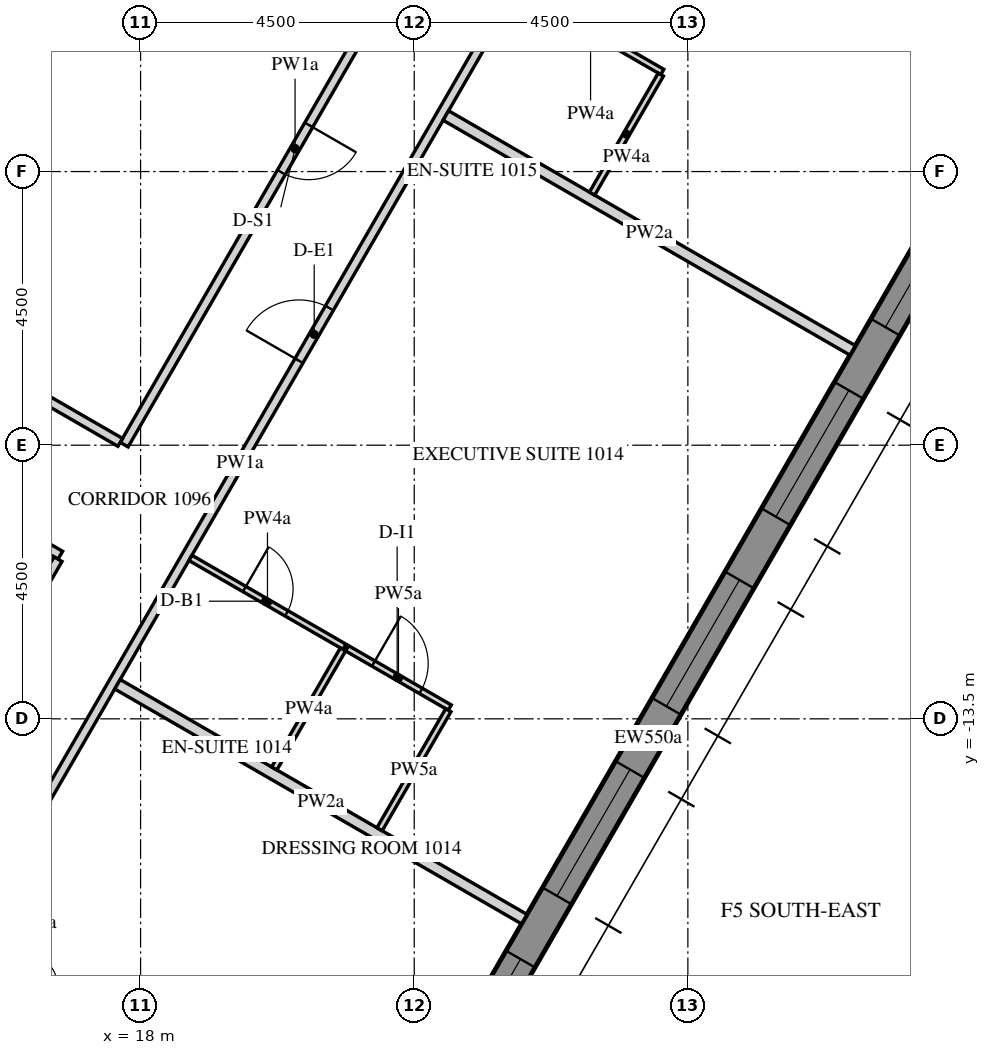
"""IFC4 building model, lengths in metres.
Left out: names, types, materials, properties, quantities, classifications, styles, units other than length and angle.
Written with IfcOpenShell. Run it as: python <this file> out.ifc"""

import sys

from ifc_helpers import new_model, si_unit, direction, frame, frame_2d, origin, place, context, subcontext, project, spatial, polyline, rectangle, outline, extrude, element, fill, save


model = new_model("IFC4")
c1 = context("Model", 3, precision=1e-05, world=origin(), true_north=direction((0.0, 1.0)))
c2 = subcontext(c1, "Body", "Model", "MODEL_VIEW")
j1 = project(units=[si_unit("LENGTHUNIT", "METRE"), si_unit("PLANEANGLEUNIT", "RADIAN")], contexts=[c1])
p1 = place(None, origin())
s1 = spatial("IfcSite", under=j1, at=p1, CompositionType="ELEMENT")
p2 = place(p1, origin())
s2 = spatial("IfcBuilding", under=s1, at=p2, CompositionType="ELEMENT")
p3 = place(p2, frame((0.0, 0.0, 142.8)))
s3 = spatial("IfcBuildingStorey", under=s2, at=p3, CompositionType="ELEMENT", Elevation=142.8)
p4 = place(p3, frame((18.83, -26.835, -0.15), z_axis=(0.0, 0.0, 1.0), x_axis=(0.500003800416, 0.866023209602, 0.0)))
e1 = element("IfcWall", 1, at=p4, inside=s3, PredefinedType="SOLIDWALL", context=c2, shape_type="SweptSolid", body=[
    extrude(outline(polyline([(-0.022, -0.275), (30.097, -0.275), (30.045, 0.275), (0.022, 0.275), (-0.022, -0.275)])), origin(), (0.0, 0.0, 1.0), 3.75),
])
p5 = place(p4, frame((1.236, 0.0, 1.05)))
e2 = element("IfcOpeningElement", 2, at=p5, cuts=e1, PredefinedType="OPENING", context=c2, shape_type="SweptSolid", body=[
    extrude(rectangle(XDim=2.4, YDim=2.4, at=frame_2d((1.2, 1.2))), frame((0.0, 0.285, 0.0), z_axis=(0.0, -1.0, 0.0), x_axis=(1.0, 0.0, 0.0)), (0.0, 0.0, 1.0), 0.57),
])
p6 = place(p4, frame((4.835, 0.0, 1.05)))
e3 = element("IfcOpeningElement", 3, at=p6, cuts=e1, PredefinedType="OPENING", context=c2, shape_type="SweptSolid", body=[
    extrude(rectangle(XDim=2.4, YDim=2.4, at=frame_2d((1.2, 1.2))), frame((0.0, 0.285, 0.0), z_axis=(0.0, -1.0, 0.0), x_axis=(1.0, 0.0, 0.0)), (0.0, 0.0, 1.0), 0.57),
])
p7 = place(p4, frame((8.436, 0.0, 1.05)))
e4 = element("IfcOpeningElement", 4, at=p7, cuts=e1, PredefinedType="OPENING", context=c2, shape_type="SweptSolid", body=[
    extrude(rectangle(XDim=2.4, YDim=2.4, at=frame_2d((1.2, 1.2))), frame((0.0, 0.285, 0.0), z_axis=(0.0, -1.0, 0.0), x_axis=(1.0, 0.0, 0.0)), (0.0, 0.0, 1.0), 0.57),
])
p8 = place(p4, frame((12.035, 0.0, 1.05)))
e5 = element("IfcOpeningElement", 5, at=p8, cuts=e1, PredefinedType="OPENING", context=c2, shape_type="SweptSolid", body=[
    extrude(rectangle(XDim=2.4, YDim=2.4, at=frame_2d((1.2, 1.2))), frame((0.0, 0.285, 0.0), z_axis=(0.0, -1.0, 0.0), x_axis=(1.0, 0.0, 0.0)), (0.0, 0.0, 1.0), 0.57),
])
p9 = place(p4, frame((15.635, 0.0, 1.05)))
e6 = element("IfcOpeningElement", 6, at=p9, cuts=e1, PredefinedType="OPENING", context=c2, shape_type="SweptSolid", body=[
    extrude(rectangle(XDim=2.4, YDim=2.4, at=frame_2d((1.2, 1.2))), frame((0.0, 0.285, 0.0), z_axis=(0.0, -1.0, 0.0), x_axis=(1.0, 0.0, 0.0)), (0.0, 0.0, 1.0), 0.57),
])
p10 = place(p4, frame((19.236, 0.0, 1.05)))
e7 = element("IfcOpeningElement", 7, at=p10, cuts=e1, PredefinedType="OPENING", context=c2, shape_type="SweptSolid", body=[
    extrude(rectangle(XDim=2.4, YDim=2.4, at=frame_2d((1.2, 1.2))), frame((0.0, 0.285, 0.0), z_axis=(0.0, -1.0, 0.0), x_axis=(1.0, 0.0, 0.0)), (0.0, 0.0, 1.0), 0.57),
])
p11 = place(p4, frame((22.835, 0.0, 1.05)))
e8 = element("IfcOpeningElement", 8, at=p11, cuts=e1, PredefinedType="OPENING", context=c2, shape_type="SweptSolid", body=[
    extrude(rectangle(XDim=2.4, YDim=2.4, at=frame_2d((1.2, 1.2))), frame((0.0, 0.285, 0.0), z_axis=(0.0, -1.0, 0.0), x_axis=(1.0, 0.0, 0.0)), (0.0, 0.0, 1.0), 0.57),
])
p12 = place(p4, frame((26.436, 0.0, 1.05)))
e9 = element("IfcOpeningElement", 9, at=p12, cuts=e1, PredefinedType="OPENING", context=c2, shape_type="SweptSolid", body=[
    extrude(rectangle(XDim=2.4, YDim=2.4, at=frame_2d((1.2, 1.2))), frame((0.0, 0.285, 0.0), z_axis=(0.0, -1.0, 0.0), x_axis=(1.0, 0.0, 0.0)), (0.0, 0.0, 1.0), 0.57),
])
p13 = place(p3, frame((8.083, -14.0, -0.15), z_axis=(0.0, 0.0, 1.0), x_axis=(0.499997680643, -0.866026742862, 0.0)))
e10 = element("IfcWall", 10, at=p13, inside=s3, PredefinedType="SHEAR", context=c2, shape_type="SweptSolid", body=[
    extrude(rectangle(XDim=16.509, YDim=0.6, at=frame_2d((8.254, 0.0))), origin(), (0.0, 0.0, 1.0), 3.75),
])
p14 = place(p13, frame((7.354, 0.0, 0.15)))
e11 = element("IfcOpeningElement", 11, at=p14, cuts=e10, PredefinedType="OPENING", context=c2, shape_type="SweptSolid", body=[
    extrude(rectangle(XDim=1.8, YDim=2.4, at=frame_2d((0.9, 1.2))), frame((0.0, 0.31, 0.0), z_axis=(0.0, -1.0, 0.0), x_axis=(1.0, 0.0, 0.0)), (0.0, 0.0, 1.0), 0.62),
])
p15 = place(p3, frame((13.755, -19.475, 0.0), z_axis=(0.0, 0.0, 1.0), x_axis=(0.50000013933, 0.866025323342, 0.0)))
e12 = element("IfcWall", 12, at=p15, inside=s3, PredefinedType="PARTITIONING", context=c2, shape_type="SweptSolid", body=[
    extrude(rectangle(XDim=23.517, YDim=0.15, at=frame_2d((11.758, 0.0))), origin(), (0.0, 0.0, 1.0), 2.838),
])
p16 = place(p15, frame((4.456, 0.0, 0.0)))
e13 = element("IfcOpeningElement", 13, at=p16, cuts=e12, PredefinedType="OPENING", context=c2, shape_type="SweptSolid", body=[
    extrude(rectangle(XDim=1.0, YDim=2.1, at=frame_2d((0.5, 1.05))), frame((0.0, 0.085, 0.0), z_axis=(0.0, -1.0, 0.0), x_axis=(1.0, 0.0, 0.0)), (0.0, 0.0, 1.0), 0.17),
])
p17 = place(p15, frame((13.699, 0.0, 0.0)))
e14 = element("IfcOpeningElement", 14, at=p17, cuts=e12, PredefinedType="OPENING", context=c2, shape_type="SweptSolid", body=[
    extrude(rectangle(XDim=1.0, YDim=2.1, at=frame_2d((0.5, 1.05))), frame((0.0, 0.085, 0.0), z_axis=(0.0, -1.0, 0.0), x_axis=(1.0, 0.0, 0.0)), (0.0, 0.0, 1.0), 0.17),
])
p18 = place(p15, frame((21.658, 0.0, 0.0)))
e15 = element("IfcOpeningElement", 15, at=p18, cuts=e12, PredefinedType="OPENING", context=c2, shape_type="SweptSolid", body=[
    extrude(rectangle(XDim=1.0, YDim=2.1, at=frame_2d((0.5, 1.05))), frame((0.0, 0.085, 0.0), z_axis=(0.0, -1.0, 0.0), x_axis=(1.0, 0.0, 0.0)), (0.0, 0.0, 1.0), 0.17),
])
p19 = place(p3, frame((23.351, 0.745, 0.0), z_axis=(0.0, 0.0, 1.0), x_axis=(-0.500009458068, -0.866019943097, 0.0)))
e16 = element("IfcWall", 16, at=p19, inside=s3, PredefinedType="PARTITIONING", context=c2, shape_type="SweptSolid", body=[
    extrude(rectangle(XDim=11.241, YDim=0.15, at=frame_2d((5.621, 0.0))), origin(), (0.0, 0.0, 1.0), 2.838),
])
p20 = place(p19, frame((5.171, 0.0, 0.0)))
e17 = element("IfcOpeningElement", 17, at=p20, cuts=e16, PredefinedType="OPENING", context=c2, shape_type="SweptSolid", body=[
    extrude(rectangle(XDim=0.9, YDim=2.1, at=frame_2d((0.45, 1.05))), frame((0.0, 0.085, 0.0), z_axis=(0.0, -1.0, 0.0), x_axis=(1.0, 0.0, 0.0)), (0.0, 0.0, 1.0), 0.17),
])
p21 = place(p3, frame((17.665, -8.953, 0.0), z_axis=(0.0, 0.0, 1.0), x_axis=(-0.866025774745, 0.499999357477, 0.0)))
e18 = element("IfcWall", 18, at=p21, inside=s3, PredefinedType="PARTITIONING", context=c2, shape_type="SweptSolid", body=[
    extrude(rectangle(XDim=5.775, YDim=0.15, at=frame_2d((2.887, 0.0))), origin(), (0.0, 0.0, 1.0), 2.838),
])
p22 = place(p3, frame((11.614, -7.884, 0.0), z_axis=(0.0, 0.0, 1.0), x_axis=(0.866018092707, -0.500012662943, 0.0)))
e19 = element("IfcWall", 19, at=p22, inside=s3, PredefinedType="PARTITIONING", context=c2, shape_type="SweptSolid", body=[
    extrude(rectangle(XDim=5.85, YDim=0.15, at=frame_2d((2.925, 0.0))), origin(), (0.0, 0.0, 1.0), 2.838),
])
p23 = place(p3, frame((16.643, -10.874, 0.0), z_axis=(0.0, 0.0, 1.0), x_axis=(-0.50000192383, -0.866024293058, 0.0)))
e20 = element("IfcWall", 20, at=p23, inside=s3, PredefinedType="PARTITIONING", context=c2, shape_type="SweptSolid", body=[
    extrude(rectangle(XDim=8.293, YDim=0.15, at=frame_2d((4.146, 0.0))), origin(), (0.0, 0.0, 1.0), 2.838),
])
p24 = place(p23, frame((3.697, 0.0, 0.0)))
e21 = element("IfcOpeningElement", 21, at=p24, cuts=e20, PredefinedType="OPENING", context=c2, shape_type="SweptSolid", body=[
    extrude(rectangle(XDim=0.9, YDim=2.1, at=frame_2d((0.45, 1.05))), frame((0.0, 0.085, 0.0), z_axis=(0.0, -1.0, 0.0), x_axis=(1.0, 0.0, 0.0)), (0.0, 0.0, 1.0), 0.17),
])
p25 = place(p3, frame((14.977, -17.509, 0.0), z_axis=(0.0, 0.0, 1.0), x_axis=(0.866046596414, -0.499963291492, 0.0)))
e22 = element("IfcWall", 22, at=p25, inside=s3, PredefinedType="PARTITIONING", context=c2, shape_type="SweptSolid", body=[
    extrude(rectangle(XDim=2.925, YDim=0.1, at=frame_2d((1.462, 0.0))), origin(), (0.0, 0.0, 1.0), 2.838),
])
p26 = place(p25, frame((1.025, 0.0, 0.0)))
e23 = element("IfcOpeningElement", 23, at=p26, cuts=e22, PredefinedType="OPENING", context=c2, shape_type="SweptSolid", body=[
    extrude(rectangle(XDim=0.8, YDim=2.1, at=frame_2d((0.4, 1.05))), frame((0.0, 0.06, 0.0), z_axis=(0.0, -1.0, 0.0), x_axis=(1.0, 0.0, 0.0)), (0.0, 0.0, 1.0), 0.12),
])
p27 = place(p3, frame((24.31, -16.794, 0.0), z_axis=(0.0, 0.0, 1.0), x_axis=(-0.866027174938, 0.499996932259, 0.0)))
e24 = element("IfcWall", 24, at=p27, inside=s3, PredefinedType="PARTITIONING", context=c2, shape_type="SweptSolid", body=[
    extrude(rectangle(XDim=7.725, YDim=0.18, at=frame_2d((3.863, 0.0))), origin(), (0.0, 0.0, 1.0), 2.838),
])
p28 = place(p3, frame((18.82, -10.853, 0.0), z_axis=(0.0, 0.0, 1.0), x_axis=(0.866046596414, -0.499963291492, 0.0)))
e25 = element("IfcWall", 25, at=p28, inside=s3, PredefinedType="PARTITIONING", context=c2, shape_type="SweptSolid", body=[
    extrude(rectangle(XDim=2.925, YDim=0.1, at=frame_2d((1.462, 0.0))), origin(), (0.0, 0.0, 1.0), 2.838),
])
p29 = place(p28, frame((1.025, 0.0, 0.0)))
e26 = element("IfcOpeningElement", 26, at=p29, cuts=e25, PredefinedType="OPENING", context=c2, shape_type="SweptSolid", body=[
    extrude(rectangle(XDim=0.8, YDim=2.1, at=frame_2d((0.4, 1.05))), frame((0.0, 0.06, 0.0), z_axis=(0.0, -1.0, 0.0), x_axis=(1.0, 0.0, 0.0)), (0.0, 0.0, 1.0), 0.12),
])
p30 = place(p3, frame((21.396, -12.34, 0.0), z_axis=(0.0, 0.0, 1.0), x_axis=(0.866031321059, -0.49998975084, 0.0)))
e27 = element("IfcWall", 27, at=p30, inside=s3, PredefinedType="PARTITIONING", context=c2, shape_type="SweptSolid", body=[
    extrude(rectangle(XDim=1.95, YDim=0.1, at=frame_2d((0.975, 0.0))), origin(), (0.0, 0.0, 1.0), 2.838),
])
p31 = place(p30, frame((0.5, 0.0, 0.0)))
e28 = element("IfcOpeningElement", 28, at=p31, cuts=e27, PredefinedType="OPENING", context=c2, shape_type="SweptSolid", body=[
    extrude(rectangle(XDim=0.9, YDim=2.1, at=frame_2d((0.45, 1.05))), frame((0.0, 0.06, 0.0), z_axis=(0.0, -1.0, 0.0), x_axis=(1.0, 0.0, 0.0)), (0.0, 0.0, 1.0), 0.12),
])
p32 = place(p3, frame((23.06, -13.359, 0.0), z_axis=(0.0, 0.0, 1.0), x_axis=(-0.49995000081, -0.866054268906, 0.0)))
e29 = element("IfcWall", 29, at=p32, inside=s3, PredefinedType="PARTITIONING", context=c2, shape_type="SweptSolid", body=[
    extrude(rectangle(XDim=2.26, YDim=0.1, at=frame_2d((1.13, 0.0))), origin(), (0.0, 0.0, 1.0), 2.838),
])
p33 = place(p3, frame((29.71, -7.441, 0.0), z_axis=(0.0, 0.0, 1.0), x_axis=(-0.866019273868, 0.500010617176, 0.0)))
e30 = element("IfcWall", 30, at=p33, inside=s3, PredefinedType="PARTITIONING", context=c2, shape_type="SweptSolid", body=[
    extrude(rectangle(XDim=7.725, YDim=0.18, at=frame_2d((3.862, 0.0))), origin(), (0.0, 0.0, 1.0), 2.838),
])
p34 = place(p3, frame((20.198, -14.316, 0.0), z_axis=(0.0, 0.0, 1.0), x_axis=(0.500031020067, 0.8660074936, 0.0)))
e31 = element("IfcWall", 31, at=p34, inside=s3, PredefinedType="PARTITIONING", context=c2, shape_type="SweptSolid", body=[
    extrude(rectangle(XDim=2.26, YDim=0.1, at=frame_2d((1.13, 0.0))), origin(), (0.0, 0.0, 1.0), 2.838),
])
p35 = place(p3, frame((24.22, -1.5, 0.0), z_axis=(0.0, 0.0, 1.0), x_axis=(0.866012511928, -0.500022328685, 0.0)))
e32 = element("IfcWall", 32, at=p35, inside=s3, PredefinedType="PARTITIONING", context=c2, shape_type="SweptSolid", body=[
    extrude(rectangle(XDim=2.725, YDim=0.1, at=frame_2d((1.363, 0.0))), origin(), (0.0, 0.0, 1.0), 2.838),
])
p36 = place(p35, frame((0.925, 0.0, 0.0)))
e33 = element("IfcOpeningElement", 33, at=p36, cuts=e32, PredefinedType="OPENING", context=c2, shape_type="SweptSolid", body=[
    extrude(rectangle(XDim=0.8, YDim=2.1, at=frame_2d((0.4, 1.05))), frame((0.0, 0.06, 0.0), z_axis=(0.0, -1.0, 0.0), x_axis=(1.0, 0.0, 0.0)), (0.0, 0.0, 1.0), 0.12),
])
p37 = place(p3, frame((26.555, -2.906, 0.0), z_axis=(0.0, 0.0, 1.0), x_axis=(-0.500077800282, -0.865980481111, 0.0)))
e34 = element("IfcWall", 34, at=p37, inside=s3, PredefinedType="PARTITIONING", context=c2, shape_type="SweptSolid", body=[
    extrude(rectangle(XDim=2.26, YDim=0.1, at=frame_2d((1.13, 0.0))), origin(), (0.0, 0.0, 1.0), 2.838),
])
p38 = place(p7, frame((0.0, 0.205, 0.0)))
e35 = element("IfcWindow", 35, at=p38, inside=s3, PartitioningType="DOUBLE_PANEL_VERTICAL", PredefinedType="WINDOW", context=c2, shape_type="SweptSolid", body=[
    extrude(rectangle(XDim=2.4, YDim=2.4, at=frame_2d((1.2, 1.2))), frame((0.0, 0.03, 0.0), z_axis=(0.0, -1.0, 0.0), x_axis=(1.0, 0.0, 0.0)), (0.0, 0.0, 1.0), 0.06),
])
fill(e4, e35)
p39 = place(p8, frame((0.0, 0.205, 0.0)))
e36 = element("IfcWindow", 36, at=p39, inside=s3, PartitioningType="DOUBLE_PANEL_VERTICAL", PredefinedType="WINDOW", context=c2, shape_type="SweptSolid", body=[
    extrude(rectangle(XDim=2.4, YDim=2.4, at=frame_2d((1.2, 1.2))), frame((0.0, 0.03, 0.0), z_axis=(0.0, -1.0, 0.0), x_axis=(1.0, 0.0, 0.0)), (0.0, 0.0, 1.0), 0.06),
])
fill(e5, e36)
p40 = place(p9, frame((0.0, 0.205, 0.0)))
e37 = element("IfcWindow", 37, at=p40, inside=s3, PartitioningType="DOUBLE_PANEL_VERTICAL", PredefinedType="WINDOW", context=c2, shape_type="SweptSolid", body=[
    extrude(rectangle(XDim=2.4, YDim=2.4, at=frame_2d((1.2, 1.2))), frame((0.0, 0.03, 0.0), z_axis=(0.0, -1.0, 0.0), x_axis=(1.0, 0.0, 0.0)), (0.0, 0.0, 1.0), 0.06),
])
fill(e6, e37)
p41 = place(p10, frame((0.0, 0.205, 0.0)))
e38 = element("IfcWindow", 38, at=p41, inside=s3, PartitioningType="DOUBLE_PANEL_VERTICAL", PredefinedType="WINDOW", context=c2, shape_type="SweptSolid", body=[
    extrude(rectangle(XDim=2.4, YDim=2.4, at=frame_2d((1.2, 1.2))), frame((0.0, 0.03, 0.0), z_axis=(0.0, -1.0, 0.0), x_axis=(1.0, 0.0, 0.0)), (0.0, 0.0, 1.0), 0.06),
])
fill(e7, e38)
p42 = place(p11, frame((0.0, 0.205, 0.0)))
e39 = element("IfcWindow", 39, at=p42, inside=s3, PartitioningType="DOUBLE_PANEL_VERTICAL", PredefinedType="WINDOW", context=c2, shape_type="SweptSolid", body=[
    extrude(rectangle(XDim=2.4, YDim=2.4, at=frame_2d((1.2, 1.2))), frame((0.0, 0.03, 0.0), z_axis=(0.0, -1.0, 0.0), x_axis=(1.0, 0.0, 0.0)), (0.0, 0.0, 1.0), 0.06),
])
fill(e8, e39)
p43 = place(p17, origin())
e40 = element("IfcDoor", 40, at=p43, inside=s3, OperationType="SINGLE_SWING_RIGHT", PredefinedType="DOOR", context=c2, shape_type="SweptSolid", body=[
    extrude(rectangle(XDim=1.0, YDim=2.1, at=frame_2d((0.5, 1.05))), frame((0.0, 0.025, 0.0), z_axis=(0.0, -1.0, 0.0), x_axis=(1.0, 0.0, 0.0)), (0.0, 0.0, 1.0), 0.05),
])
fill(e14, e40)
p44 = place(p29, origin())
e41 = element("IfcDoor", 41, at=p44, inside=s3, OperationType="SINGLE_SWING_RIGHT", PredefinedType="DOOR", context=c2, shape_type="SweptSolid", body=[
    extrude(rectangle(XDim=0.8, YDim=2.1, at=frame_2d((0.4, 1.05))), frame((0.0, 0.025, 0.0), z_axis=(0.0, -1.0, 0.0), x_axis=(1.0, 0.0, 0.0)), (0.0, 0.0, 1.0), 0.05),
])
fill(e26, e41)
p45 = place(p31, origin())
e42 = element("IfcDoor", 42, at=p45, inside=s3, OperationType="SINGLE_SWING_RIGHT", PredefinedType="DOOR", context=c2, shape_type="SweptSolid", body=[
    extrude(rectangle(XDim=0.9, YDim=2.1, at=frame_2d((0.45, 1.05))), frame((0.0, 0.025, 0.0), z_axis=(0.0, -1.0, 0.0), x_axis=(1.0, 0.0, 0.0)), (0.0, 0.0, 1.0), 0.05),
])
fill(e28, e42)
p46 = place(p20, origin())
e43 = element("IfcDoor", 43, at=p46, inside=s3, OperationType="SINGLE_SWING_LEFT", PredefinedType="DOOR", context=c2, shape_type="SweptSolid", body=[
    extrude(rectangle(XDim=0.9, YDim=2.1, at=frame_2d((0.45, 1.05))), frame((0.0, 0.025, 0.0), z_axis=(0.0, -1.0, 0.0), x_axis=(1.0, 0.0, 0.0)), (0.0, 0.0, 1.0), 0.05),
])
fill(e17, e43)
save(model, sys.argv[1])
